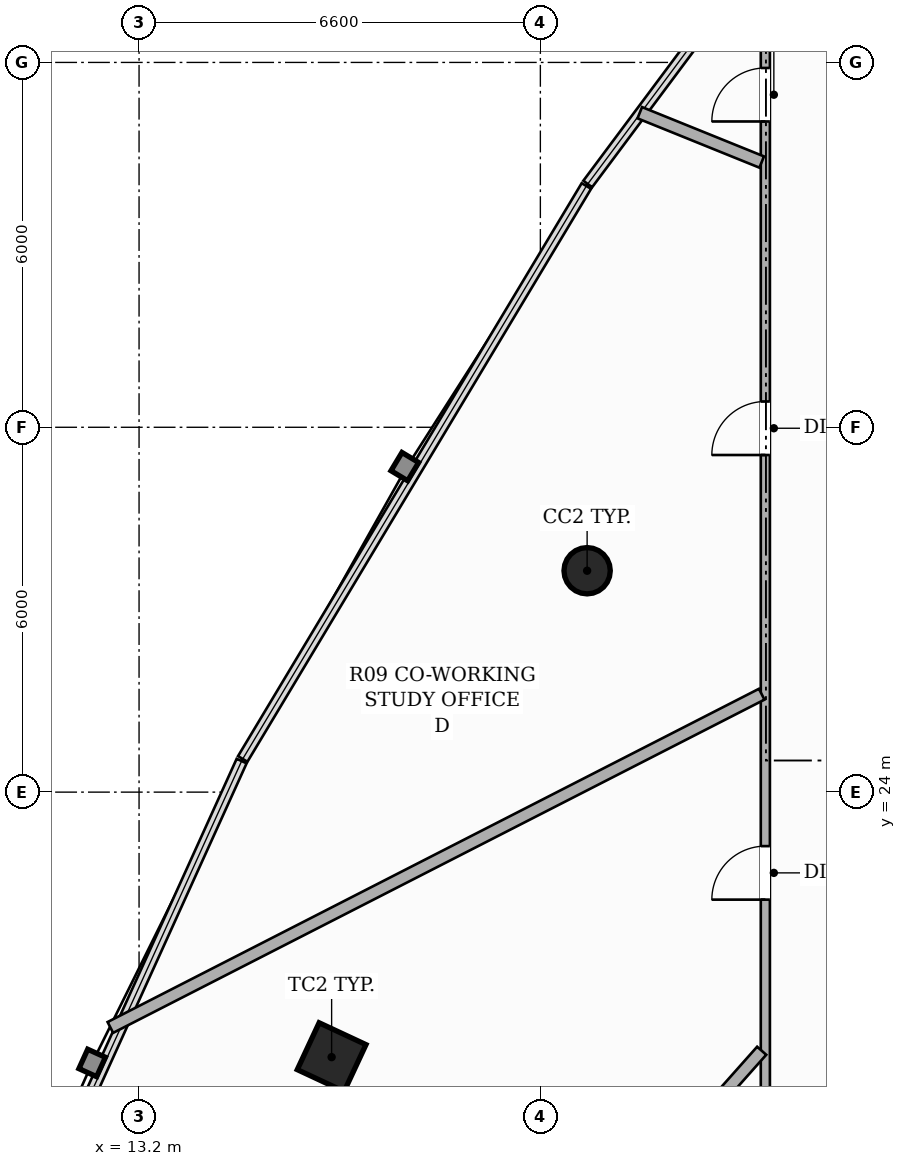
"""IFC4 building model, lengths in metres.
Left out: names, types, materials, properties, quantities, classifications, styles, units other than length and angle.
Written with IfcOpenShell. Run it as: python <this file> out.ifc"""

import sys

from ifc_helpers import new_model, si_unit, direction, frame, frame_2d, origin, origin_2d, place, context, subcontext, project, spatial, rectangle, hollow_rectangle, hollow_circle, extrude, element, fill, save


model = new_model("IFC4")
c1 = context("Model", 3, precision=1e-05, world=origin(), true_north=direction((0.0, 1.0)))
c2 = subcontext(c1, "Body", "Model", "MODEL_VIEW")
j1 = project(units=[si_unit("LENGTHUNIT", "METRE"), si_unit("PLANEANGLEUNIT", "RADIAN")], contexts=[c1])
p1 = place(None, origin())
s1 = spatial("IfcSite", under=j1, at=p1, CompositionType="ELEMENT")
p2 = place(p1, origin())
s2 = spatial("IfcBuilding", under=s1, at=p2, CompositionType="ELEMENT")
p3 = place(p2, frame((0.0, 0.0, 153.95)))
s3 = spatial("IfcBuildingStorey", under=s2, at=p3, CompositionType="ELEMENT", Elevation=153.95)
p4 = place(p3, frame((20.569, 27.641, 0.0), z_axis=(0.0, 0.0, 1.0), x_axis=(1.0, 0.0, 0.0)))
e1 = element("IfcColumn", 1, at=p4, inside=s3, PredefinedType="COLUMN", context=c2, shape_type="SweptSolid", body=[
    extrude(hollow_circle(Radius=0.381, WallThickness=0.022, at=origin_2d()), origin(), (0.0, 0.0, 1.0), 3.3),
])
p5 = place(p3, frame((16.367, 19.642, 0.0), z_axis=(0.0, 0.0, 1.0), x_axis=(0.422618261741, 0.906307787037, 0.0)))
e2 = element("IfcColumn", 2, at=p5, inside=s3, PredefinedType="COLUMN", context=c2, shape_type="SweptSolid", body=[
    extrude(hollow_rectangle(XDim=0.85, YDim=0.85, WallThickness=0.028, at=origin_2d()), origin(), (0.0, 0.0, 1.0), 3.3),
])
p6 = place(p3, frame((23.5, 14.06, 0.0), z_axis=(0.0, 0.0, 1.0), x_axis=(0.0, 1.0, 0.0)))
e3 = element("IfcWall", 3, at=p6, inside=s3, PredefinedType="PARTITIONING", context=c2, shape_type="SweptSolid", body=[
    extrude(rectangle(XDim=22.84, YDim=0.15, at=frame_2d((11.42, 0.0))), origin(), (0.0, 0.0, 1.0), 2.413),
])
p7 = place(p6, frame((8.172, 0.0, 0.0)))
e4 = element("IfcOpeningElement", 4, at=p7, cuts=e3, PredefinedType="OPENING", context=c2, shape_type="SweptSolid", body=[
    extrude(rectangle(XDim=0.88, YDim=2.1, at=frame_2d((0.44, 1.05))), frame((0.0, 0.085, 0.0), z_axis=(0.0, -1.0, 0.0), x_axis=(1.0, 0.0, 0.0)), (0.0, 0.0, 1.0), 0.17),
])
p8 = place(p6, frame((20.969, 0.0, 0.0)))
e5 = element("IfcOpeningElement", 5, at=p8, cuts=e3, PredefinedType="OPENING", context=c2, shape_type="SweptSolid", body=[
    extrude(rectangle(XDim=0.88, YDim=2.1, at=frame_2d((0.44, 1.05))), frame((0.0, 0.085, 0.0), z_axis=(0.0, -1.0, 0.0), x_axis=(1.0, 0.0, 0.0)), (0.0, 0.0, 1.0), 0.17),
])
p9 = place(p6, frame((15.484, 0.0, 0.0)))
e6 = element("IfcOpeningElement", 6, at=p9, cuts=e3, PredefinedType="OPENING", context=c2, shape_type="SweptSolid", body=[
    extrude(rectangle(XDim=0.88, YDim=2.1, at=frame_2d((0.44, 1.05))), frame((0.0, 0.085, 0.0), z_axis=(0.0, -1.0, 0.0), x_axis=(1.0, 0.0, 0.0)), (0.0, 0.0, 1.0), 0.17),
])
p10 = place(p3, frame((23.44, 19.747, 0.0), z_axis=(0.0, 0.0, 1.0), x_axis=(-0.664444771995, -0.747337370248, 0.0)))
e7 = element("IfcWall", 7, at=p10, inside=s3, PredefinedType="PARTITIONING", context=c2, shape_type="SweptSolid", body=[
    extrude(rectangle(XDim=19.097, YDim=0.2, at=frame_2d((9.549, 0.0))), origin(), (0.0, 0.0, 1.0), 2.413),
])
p11 = place(p3, frame((12.728, 20.13, 0.0), z_axis=(0.0, 0.0, 1.0), x_axis=(0.890257920911, 0.455456731486, 0.0)))
e8 = element("IfcWall", 8, at=p11, inside=s3, PredefinedType="PARTITIONING", context=c2, shape_type="SweptSolid", body=[
    extrude(rectangle(XDim=12.032, YDim=0.2, at=frame_2d((6.016, 0.0))), origin(), (0.0, 0.0, 1.0), 2.413),
])
p12 = place(p3, frame((23.44, 34.362, 0.0), z_axis=(0.0, 0.0, 1.0), x_axis=(-0.927021575741, 0.375007997395, 0.0)))
e9 = element("IfcWall", 9, at=p12, inside=s3, PredefinedType="PARTITIONING", context=c2, shape_type="SweptSolid", body=[
    extrude(rectangle(XDim=2.163, YDim=0.2, at=frame_2d((1.081, 0.0))), origin(), (0.0, 0.0, 1.0), 3.06),
])
p13 = place(p7, origin())
e10 = element("IfcDoor", 10, at=p13, inside=s3, OperationType="SINGLE_SWING_LEFT", PredefinedType="DOOR", context=c2, shape_type="SweptSolid", body=[
    extrude(rectangle(XDim=0.88, YDim=2.1, at=frame_2d((0.44, 1.05))), frame((0.0, 0.025, 0.0), z_axis=(0.0, -1.0, 0.0), x_axis=(1.0, 0.0, 0.0)), (0.0, 0.0, 1.0), 0.05),
])
fill(e4, e10)
p14 = place(p8, origin())
e11 = element("IfcDoor", 11, at=p14, inside=s3, OperationType="SINGLE_SWING_LEFT", PredefinedType="DOOR", context=c2, shape_type="SweptSolid", body=[
    extrude(rectangle(XDim=0.88, YDim=2.1, at=frame_2d((0.44, 1.05))), frame((0.0, 0.025, 0.0), z_axis=(0.0, -1.0, 0.0), x_axis=(1.0, 0.0, 0.0)), (0.0, 0.0, 1.0), 0.05),
])
fill(e5, e11)
p15 = place(p9, origin())
e12 = element("IfcDoor", 12, at=p15, inside=s3, OperationType="SINGLE_SWING_LEFT", PredefinedType="DOOR", context=c2, shape_type="SweptSolid", body=[
    extrude(rectangle(XDim=0.88, YDim=2.1, at=frame_2d((0.44, 1.05))), frame((0.0, 0.025, 0.0), z_axis=(0.0, -1.0, 0.0), x_axis=(1.0, 0.0, 0.0)), (0.0, 0.0, 1.0), 0.05),
])
fill(e6, e12)
save(model, sys.argv[1])
